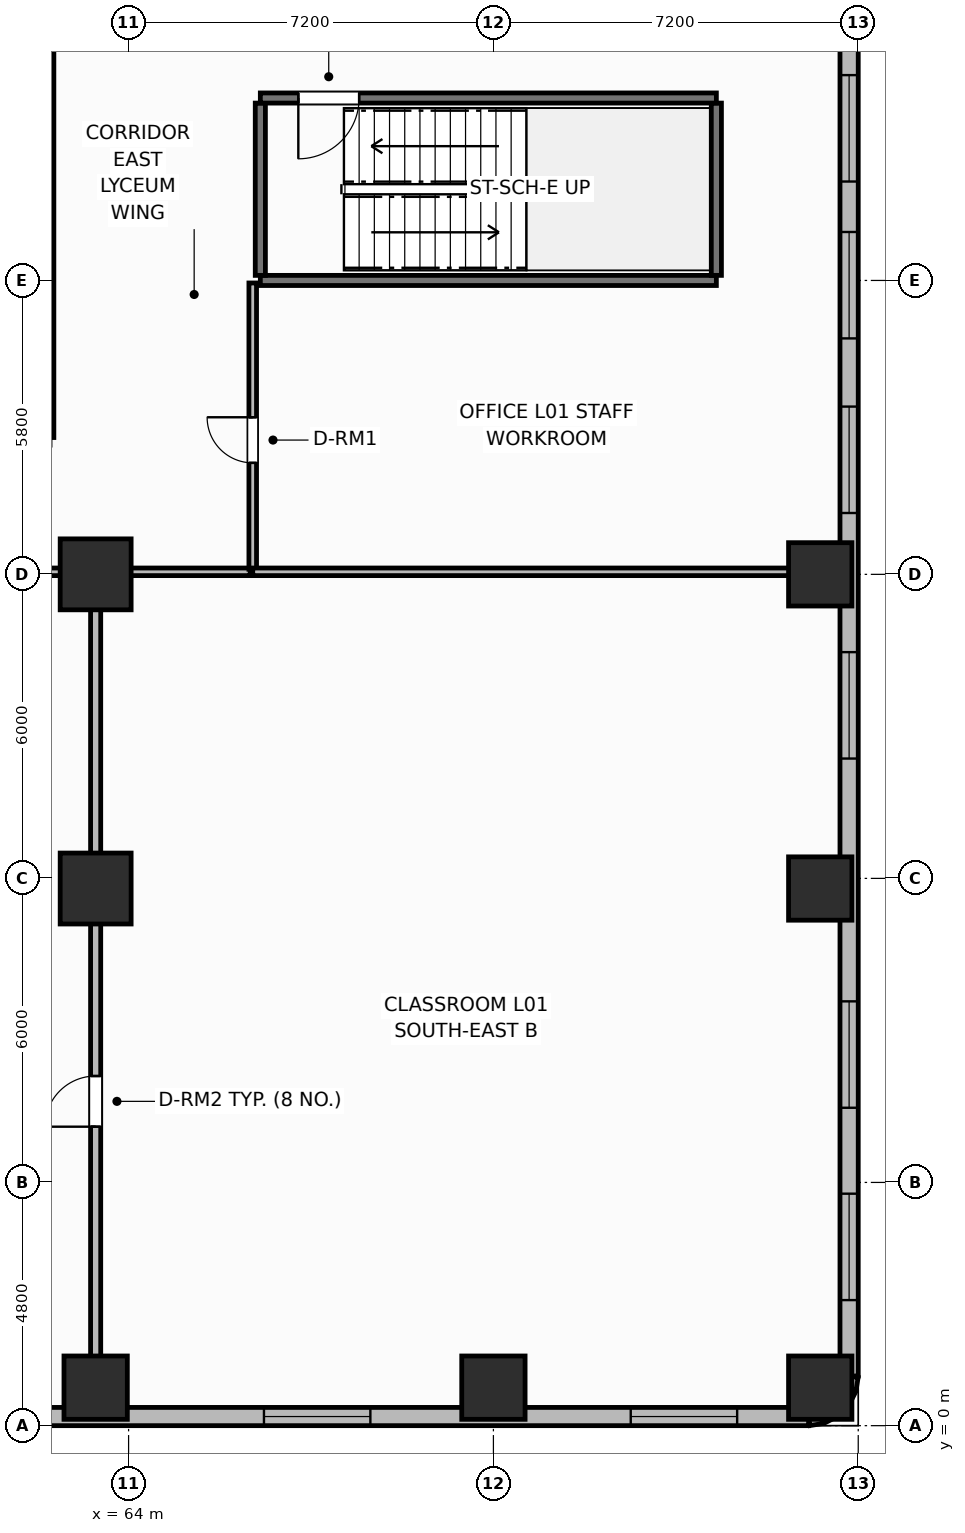
"""IFC4 building model, lengths in metres.
Left out: names, types, materials, properties, quantities, classifications, styles, units other than length and angle.
Written with IfcOpenShell. Run it as: python <this file> out.ifc"""

import sys

from ifc_helpers import new_model, si_unit, direction, frame, frame_2d, origin, origin_2d, place, context, subcontext, project, spatial, rectangle, extrude, element, fill, save


model = new_model("IFC4")
c1 = context("Model", 3, precision=1e-05, world=origin(), true_north=direction((0.0, 1.0)))
c2 = subcontext(c1, "Body", "Model", "MODEL_VIEW")
j1 = project(units=[si_unit("LENGTHUNIT", "METRE"), si_unit("PLANEANGLEUNIT", "RADIAN")], contexts=[c1])
p1 = place(None, origin())
s1 = spatial("IfcSite", under=j1, at=p1, CompositionType="ELEMENT")
p2 = place(p1, origin())
s2 = spatial("IfcBuilding", under=s1, at=p2, CompositionType="ELEMENT")
p3 = place(p2, frame((0.0, 0.0, 6.6)))
s3 = spatial("IfcBuildingStorey", under=s2, at=p3, CompositionType="ELEMENT", Elevation=6.6)
for number, where, z_axis, x_axis in (
    (1, (63.35, 0.75, 0.0), (0.0, 0.0, 1.0), (1.0, 0.0, 0.0)),
    (2, (71.2, 0.75, 0.0), (0.0, 0.0, 1.0), (1.0, 0.0, 0.0)),
    (3, (77.65, 0.75, 0.0), (0.0, 0.0, 1.0), (1.0, 0.0, 0.0)),
    (4, (77.65, 10.6, 0.0), (0.0, 0.0, 1.0), (1.0, 0.0, 0.0)),
    (5, (77.65, 16.8, 0.0), (0.0, 0.0, 1.0), (1.0, 0.0, 0.0)),
):
    element("IfcColumn", number, at=place(p3, frame(where, z_axis=z_axis, x_axis=x_axis)), inside=s3, PredefinedType="COLUMN", context=c2, shape_type="SweptSolid", body=[
        extrude(rectangle(XDim=1.25, YDim=1.25, at=origin_2d()), origin(), (0.0, 0.0, 1.0), 4.5),
    ])
for number, where, z_axis, x_axis in (
    (6, (63.35, 10.6, 0.0), (0.0, 0.0, 1.0), (1.0, 0.0, 0.0)),
    (7, (63.35, 16.8, 0.0), (0.0, 0.0, 1.0), (1.0, 0.0, 0.0)),
):
    element("IfcColumn", number, at=place(p3, frame(where, z_axis=z_axis, x_axis=x_axis)), inside=s3, PredefinedType="COLUMN", context=c2, shape_type="SweptSolid", body=[
        extrude(rectangle(XDim=1.4, YDim=1.4, at=origin_2d()), origin(), (0.0, 0.0, 1.0), 4.5),
    ])
p4 = place(p3, frame((21.83, 0.18, 0.0), z_axis=(0.0, 0.0, 1.0), x_axis=(1.0, 0.0, 0.0)))
e8 = element("IfcWall", 8, at=p4, inside=s3, PredefinedType="SOLIDWALL", context=c2, shape_type="SweptSolid", body=[
    extrude(rectangle(XDim=55.59, YDim=0.36, at=frame_2d((27.795, 0.0))), origin(), (0.0, 0.0, 1.0), 3.48),
])
p5 = place(p4, frame((5.029, 0.0, 0.85)))
e9 = element("IfcOpeningElement", 9, at=p5, cuts=e8, PredefinedType="OPENING", context=c2, shape_type="SweptSolid", body=[
    extrude(rectangle(XDim=2.1, YDim=2.2, at=frame_2d((1.05, 1.1))), frame((0.0, 0.19, 0.0), z_axis=(0.0, -1.0, 0.0), x_axis=(1.0, 0.0, 0.0)), (0.0, 0.0, 1.0), 0.38),
])
p6 = place(p4, frame((8.648, 0.0, 0.85)))
e10 = element("IfcOpeningElement", 10, at=p6, cuts=e8, PredefinedType="OPENING", context=c2, shape_type="SweptSolid", body=[
    extrude(rectangle(XDim=2.1, YDim=2.2, at=frame_2d((1.05, 1.1))), frame((0.0, 0.19, 0.0), z_axis=(0.0, -1.0, 0.0), x_axis=(1.0, 0.0, 0.0)), (0.0, 0.0, 1.0), 0.38),
])
p7 = place(p4, frame((12.268, 0.0, 0.85)))
e11 = element("IfcOpeningElement", 11, at=p7, cuts=e8, PredefinedType="OPENING", context=c2, shape_type="SweptSolid", body=[
    extrude(rectangle(XDim=2.1, YDim=2.2, at=frame_2d((1.05, 1.1))), frame((0.0, 0.19, 0.0), z_axis=(0.0, -1.0, 0.0), x_axis=(1.0, 0.0, 0.0)), (0.0, 0.0, 1.0), 0.38),
])
p8 = place(p4, frame((19.506, 0.0, 0.85)))
e12 = element("IfcOpeningElement", 12, at=p8, cuts=e8, PredefinedType="OPENING", context=c2, shape_type="SweptSolid", body=[
    extrude(rectangle(XDim=2.1, YDim=2.2, at=frame_2d((1.05, 1.1))), frame((0.0, 0.19, 0.0), z_axis=(0.0, -1.0, 0.0), x_axis=(1.0, 0.0, 0.0)), (0.0, 0.0, 1.0), 0.38),
])
p9 = place(p4, frame((23.126, 0.0, 0.85)))
e13 = element("IfcOpeningElement", 13, at=p9, cuts=e8, PredefinedType="OPENING", context=c2, shape_type="SweptSolid", body=[
    extrude(rectangle(XDim=2.1, YDim=2.2, at=frame_2d((1.05, 1.1))), frame((0.0, 0.19, 0.0), z_axis=(0.0, -1.0, 0.0), x_axis=(1.0, 0.0, 0.0)), (0.0, 0.0, 1.0), 0.38),
])
p10 = place(p4, frame((26.745, 0.0, 0.85)))
e14 = element("IfcOpeningElement", 14, at=p10, cuts=e8, PredefinedType="OPENING", context=c2, shape_type="SweptSolid", body=[
    extrude(rectangle(XDim=2.1, YDim=2.2, at=frame_2d((1.05, 1.1))), frame((0.0, 0.19, 0.0), z_axis=(0.0, -1.0, 0.0), x_axis=(1.0, 0.0, 0.0)), (0.0, 0.0, 1.0), 0.38),
])
p11 = place(p4, frame((33.984, 0.0, 0.85)))
e15 = element("IfcOpeningElement", 15, at=p11, cuts=e8, PredefinedType="OPENING", context=c2, shape_type="SweptSolid", body=[
    extrude(rectangle(XDim=2.1, YDim=2.2, at=frame_2d((1.05, 1.1))), frame((0.0, 0.19, 0.0), z_axis=(0.0, -1.0, 0.0), x_axis=(1.0, 0.0, 0.0)), (0.0, 0.0, 1.0), 0.38),
])
p12 = place(p4, frame((37.603, 0.0, 0.85)))
e16 = element("IfcOpeningElement", 16, at=p12, cuts=e8, PredefinedType="OPENING", context=c2, shape_type="SweptSolid", body=[
    extrude(rectangle(XDim=2.1, YDim=2.2, at=frame_2d((1.05, 1.1))), frame((0.0, 0.19, 0.0), z_axis=(0.0, -1.0, 0.0), x_axis=(1.0, 0.0, 0.0)), (0.0, 0.0, 1.0), 0.38),
])
p13 = place(p4, frame((44.842, 0.0, 0.85)))
e17 = element("IfcOpeningElement", 17, at=p13, cuts=e8, PredefinedType="OPENING", context=c2, shape_type="SweptSolid", body=[
    extrude(rectangle(XDim=2.1, YDim=2.2, at=frame_2d((1.05, 1.1))), frame((0.0, 0.19, 0.0), z_axis=(0.0, -1.0, 0.0), x_axis=(1.0, 0.0, 0.0)), (0.0, 0.0, 1.0), 0.38),
])
p14 = place(p4, frame((52.08, 0.0, 0.85)))
e18 = element("IfcOpeningElement", 18, at=p14, cuts=e8, PredefinedType="OPENING", context=c2, shape_type="SweptSolid", body=[
    extrude(rectangle(XDim=2.1, YDim=2.2, at=frame_2d((1.05, 1.1))), frame((0.0, 0.19, 0.0), z_axis=(0.0, -1.0, 0.0), x_axis=(1.0, 0.0, 0.0)), (0.0, 0.0, 1.0), 0.38),
])
p15 = place(p3, frame((77.42, 0.18, 0.0), z_axis=(0.0, 0.0, 1.0), x_axis=(0.987604361038, 0.156963773077, 0.0)))
e19 = element("IfcWall", 19, at=p15, inside=s3, PredefinedType="SOLIDWALL", context=c2, shape_type="SweptSolid", body=[
    extrude(rectangle(XDim=0.25, YDim=0.36, at=frame_2d((0.125, 0.0))), origin(), (0.0, 0.0, 1.0), 3.48),
])
for number, where, z_axis, x_axis in (
    (20, (77.667, 0.219, 0.0), (0.0, 0.0, 1.0), (0.891, 0.454, 0.0)),
    (21, (77.89, 0.333, 0.0), (0.0, 0.0, 1.0), (0.707, 0.707, 0.0)),
):
    element("IfcWall", number, at=place(p3, frame(where, z_axis=z_axis, x_axis=x_axis)), inside=s3, PredefinedType="SOLIDWALL", context=c2, shape_type="SweptSolid", body=[
        extrude(rectangle(XDim=0.25, YDim=0.36, at=frame_2d((0.125, 0.0))), origin(), (0.0, 0.0, 1.0), 3.48),
    ])
p16 = place(p3, frame((78.067, 0.51, 0.0), z_axis=(0.0, 0.0, 1.0), x_axis=(0.454217786225, 0.89089067942, 0.0)))
e22 = element("IfcWall", 22, at=p16, inside=s3, PredefinedType="SOLIDWALL", context=c2, shape_type="SweptSolid", body=[
    extrude(rectangle(XDim=0.25, YDim=0.36, at=frame_2d((0.125, 0.0))), origin(), (0.0, 0.0, 1.0), 3.48),
])
p17 = place(p3, frame((78.181, 0.733, 0.0), z_axis=(0.0, 0.0, 1.0), x_axis=(0.156163049852, 0.987731290312, 0.0)))
e23 = element("IfcWall", 23, at=p17, inside=s3, PredefinedType="SOLIDWALL", context=c2, shape_type="SweptSolid", body=[
    extrude(rectangle(XDim=0.25, YDim=0.36, at=frame_2d((0.125, 0.0))), origin(), (0.0, 0.0, 1.0), 3.48),
])
p18 = place(p3, frame((78.22, 0.98, 0.0), z_axis=(0.0, 0.0, 1.0), x_axis=(0.0, 1.0, 0.0)))
e24 = element("IfcWall", 24, at=p18, inside=s3, PredefinedType="SOLIDWALL", context=c2, shape_type="SweptSolid", body=[
    extrude(rectangle(XDim=54.44, YDim=0.36, at=frame_2d((27.22, 0.0))), origin(), (0.0, 0.0, 1.0), 3.48),
])
p19 = place(p18, frame((1.498, 0.0, 0.85)))
e25 = element("IfcOpeningElement", 25, at=p19, cuts=e24, PredefinedType="OPENING", context=c2, shape_type="SweptSolid", body=[
    extrude(rectangle(XDim=2.1, YDim=2.2, at=frame_2d((1.05, 1.1))), frame((0.0, 0.19, 0.0), z_axis=(0.0, -1.0, 0.0), x_axis=(1.0, 0.0, 0.0)), (0.0, 0.0, 1.0), 0.38),
])
p20 = place(p18, frame((5.294, 0.0, 0.85)))
e26 = element("IfcOpeningElement", 26, at=p20, cuts=e24, PredefinedType="OPENING", context=c2, shape_type="SweptSolid", body=[
    extrude(rectangle(XDim=2.1, YDim=2.2, at=frame_2d((1.05, 1.1))), frame((0.0, 0.19, 0.0), z_axis=(0.0, -1.0, 0.0), x_axis=(1.0, 0.0, 0.0)), (0.0, 0.0, 1.0), 0.38),
])
p21 = place(p18, frame((12.185, 0.0, 0.85)))
e27 = element("IfcOpeningElement", 27, at=p21, cuts=e24, PredefinedType="OPENING", context=c2, shape_type="SweptSolid", body=[
    extrude(rectangle(XDim=2.1, YDim=2.2, at=frame_2d((1.05, 1.1))), frame((0.0, 0.19, 0.0), z_axis=(0.0, -1.0, 0.0), x_axis=(1.0, 0.0, 0.0)), (0.0, 0.0, 1.0), 0.38),
])
p22 = place(p18, frame((17.031, 0.0, 0.85)))
e28 = element("IfcOpeningElement", 28, at=p22, cuts=e24, PredefinedType="OPENING", context=c2, shape_type="SweptSolid", body=[
    extrude(rectangle(XDim=2.1, YDim=2.2, at=frame_2d((1.05, 1.1))), frame((0.0, 0.19, 0.0), z_axis=(0.0, -1.0, 0.0), x_axis=(1.0, 0.0, 0.0)), (0.0, 0.0, 1.0), 0.38),
])
p23 = place(p18, frame((20.476, 0.0, 0.85)))
e29 = element("IfcOpeningElement", 29, at=p23, cuts=e24, PredefinedType="OPENING", context=c2, shape_type="SweptSolid", body=[
    extrude(rectangle(XDim=2.1, YDim=2.2, at=frame_2d((1.05, 1.1))), frame((0.0, 0.19, 0.0), z_axis=(0.0, -1.0, 0.0), x_axis=(1.0, 0.0, 0.0)), (0.0, 0.0, 1.0), 0.38),
])
p24 = place(p18, frame((23.572, 0.0, 0.85)))
e30 = element("IfcOpeningElement", 30, at=p24, cuts=e24, PredefinedType="OPENING", context=c2, shape_type="SweptSolid", body=[
    extrude(rectangle(XDim=2.1, YDim=2.2, at=frame_2d((1.05, 1.1))), frame((0.0, 0.19, 0.0), z_axis=(0.0, -1.0, 0.0), x_axis=(1.0, 0.0, 0.0)), (0.0, 0.0, 1.0), 0.38),
])
p25 = place(p18, frame((28.768, 0.0, 0.85)))
e31 = element("IfcOpeningElement", 31, at=p25, cuts=e24, PredefinedType="OPENING", context=c2, shape_type="SweptSolid", body=[
    extrude(rectangle(XDim=2.1, YDim=2.2, at=frame_2d((1.05, 1.1))), frame((0.0, 0.19, 0.0), z_axis=(0.0, -1.0, 0.0), x_axis=(1.0, 0.0, 0.0)), (0.0, 0.0, 1.0), 0.38),
])
p26 = place(p18, frame((31.864, 0.0, 0.85)))
e32 = element("IfcOpeningElement", 32, at=p26, cuts=e24, PredefinedType="OPENING", context=c2, shape_type="SweptSolid", body=[
    extrude(rectangle(XDim=2.1, YDim=2.2, at=frame_2d((1.05, 1.1))), frame((0.0, 0.19, 0.0), z_axis=(0.0, -1.0, 0.0), x_axis=(1.0, 0.0, 0.0)), (0.0, 0.0, 1.0), 0.38),
])
p27 = place(p18, frame((35.309, 0.0, 0.85)))
e33 = element("IfcOpeningElement", 33, at=p27, cuts=e24, PredefinedType="OPENING", context=c2, shape_type="SweptSolid", body=[
    extrude(rectangle(XDim=2.1, YDim=2.2, at=frame_2d((1.05, 1.1))), frame((0.0, 0.19, 0.0), z_axis=(0.0, -1.0, 0.0), x_axis=(1.0, 0.0, 0.0)), (0.0, 0.0, 1.0), 0.38),
])
p28 = place(p18, frame((40.155, 0.0, 0.85)))
e34 = element("IfcOpeningElement", 34, at=p28, cuts=e24, PredefinedType="OPENING", context=c2, shape_type="SweptSolid", body=[
    extrude(rectangle(XDim=2.1, YDim=2.2, at=frame_2d((1.05, 1.1))), frame((0.0, 0.19, 0.0), z_axis=(0.0, -1.0, 0.0), x_axis=(1.0, 0.0, 0.0)), (0.0, 0.0, 1.0), 0.38),
])
p29 = place(p18, frame((47.046, 0.0, 0.85)))
e35 = element("IfcOpeningElement", 35, at=p29, cuts=e24, PredefinedType="OPENING", context=c2, shape_type="SweptSolid", body=[
    extrude(rectangle(XDim=2.1, YDim=2.2, at=frame_2d((1.05, 1.1))), frame((0.0, 0.19, 0.0), z_axis=(0.0, -1.0, 0.0), x_axis=(1.0, 0.0, 0.0)), (0.0, 0.0, 1.0), 0.38),
])
p30 = place(p18, frame((50.842, 0.0, 0.85)))
e36 = element("IfcOpeningElement", 36, at=p30, cuts=e24, PredefinedType="OPENING", context=c2, shape_type="SweptSolid", body=[
    extrude(rectangle(XDim=2.1, YDim=2.2, at=frame_2d((1.05, 1.1))), frame((0.0, 0.19, 0.0), z_axis=(0.0, -1.0, 0.0), x_axis=(1.0, 0.0, 0.0)), (0.0, 0.0, 1.0), 0.38),
])
p31 = place(p3, frame((66.6, 22.6, 0.0), z_axis=(0.0, 0.0, 1.0), x_axis=(1.0, 0.0, 0.0)))
e37 = element("IfcWall", 37, at=p31, inside=s3, PredefinedType="SHEAR", context=c2, shape_type="SweptSolid", body=[
    extrude(rectangle(XDim=9.0, YDim=0.2, at=frame_2d((4.5, 0.0))), origin(), (0.0, 0.0, 1.0), 4.5),
])
for number, where, z_axis, x_axis in (
    (38, (66.6, 22.7, 0.0), (0.0, 0.0, 1.0), (0.0, 1.0, 0.0)),
    (39, (75.6, 22.7, 0.0), (0.0, 0.0, 1.0), (0.0, 1.0, 0.0)),
):
    element("IfcWall", number, at=place(p3, frame(where, z_axis=z_axis, x_axis=x_axis)), inside=s3, PredefinedType="SHEAR", context=c2, shape_type="SweptSolid", body=[
        extrude(rectangle(XDim=3.4, YDim=0.2, at=frame_2d((1.7, 0.0))), origin(), (0.0, 0.0, 1.0), 4.5),
    ])
p32 = place(p3, frame((75.6, 26.2, 0.0), z_axis=(0.0, 0.0, 1.0), x_axis=(-1.0, 0.0, 0.0)))
e40 = element("IfcWall", 40, at=p32, inside=s3, PredefinedType="SHEAR", context=c2, shape_type="SweptSolid", body=[
    extrude(rectangle(XDim=9.0, YDim=0.2, at=frame_2d((4.5, 0.0))), origin(), (0.0, 0.0, 1.0), 4.5),
])
p33 = place(p32, frame((7.05, 0.0, 0.0)))
e41 = element("IfcOpeningElement", 41, at=p33, cuts=e40, PredefinedType="OPENING", context=c2, shape_type="SweptSolid", body=[
    extrude(rectangle(XDim=1.2, YDim=2.15, at=frame_2d((0.6, 1.075))), frame((0.0, 0.11, 0.0), z_axis=(0.0, -1.0, 0.0), x_axis=(1.0, 0.0, 0.0)), (0.0, 0.0, 1.0), 0.22),
])
p34 = place(p3, frame((62.45, 19.5, 0.0), z_axis=(0.0, 0.0, 1.0), x_axis=(0.0, 1.0, 0.0)))
e42 = element("IfcWall", 42, at=p34, inside=s3, PredefinedType="PARTITIONING", context=c2, shape_type="SweptSolid", body=[
    extrude(rectangle(XDim=17.4, YDim=0.15, at=frame_2d((8.7, 0.0))), origin(), (0.0, 0.0, 1.0), 3.42),
])
p35 = place(p3, frame((63.35, 0.4, 0.0), z_axis=(0.0, 0.0, 1.0), x_axis=(0.0, 1.0, 0.0)))
e43 = element("IfcWall", 43, at=p35, inside=s3, PredefinedType="PARTITIONING", context=c2, shape_type="SweptSolid", body=[
    extrude(rectangle(XDim=16.4, YDim=0.2, at=frame_2d((8.2, 0.0))), origin(), (0.0, 0.0, 1.0), 3.42),
])
p36 = place(p35, frame((5.5, 0.0, 0.0)))
e44 = element("IfcOpeningElement", 44, at=p36, cuts=e43, PredefinedType="OPENING", context=c2, shape_type="SweptSolid", body=[
    extrude(rectangle(XDim=1.0, YDim=2.15, at=frame_2d((0.5, 1.075))), frame((0.0, 0.11, 0.0), z_axis=(0.0, -1.0, 0.0), x_axis=(1.0, 0.0, 0.0)), (0.0, 0.0, 1.0), 0.22),
])
p37 = place(p3, frame((53.15, 16.85, 0.0), z_axis=(0.0, 0.0, 1.0), x_axis=(1.0, 0.0, 0.0)))
e45 = element("IfcWall", 45, at=p37, inside=s3, PredefinedType="PARTITIONING", context=c2, shape_type="SweptSolid", body=[
    extrude(rectangle(XDim=13.25, YDim=0.15, at=frame_2d((6.625, 0.0))), origin(), (0.0, 0.0, 1.0), 3.42),
])
p38 = place(p37, frame((4.2, 0.0, 0.0)))
e46 = element("IfcOpeningElement", 46, at=p38, cuts=e45, PredefinedType="OPENING", context=c2, shape_type="SweptSolid", body=[
    extrude(rectangle(XDim=1.0, YDim=2.15, at=frame_2d((0.5, 1.075))), frame((0.0, 0.085, 0.0), z_axis=(0.0, -1.0, 0.0), x_axis=(1.0, 0.0, 0.0)), (0.0, 0.0, 1.0), 0.17),
])
p39 = place(p3, frame((66.45, 16.9, 0.0), z_axis=(0.0, 0.0, 1.0), x_axis=(0.0, 1.0, 0.0)))
e47 = element("IfcWall", 47, at=p39, inside=s3, PredefinedType="PARTITIONING", context=c2, shape_type="SweptSolid", body=[
    extrude(rectangle(XDim=5.65, YDim=0.15, at=frame_2d((2.825, 0.0))), origin(), (0.0, 0.0, 1.0), 3.42),
])
p40 = place(p39, frame((2.1, 0.0, 0.0)))
e48 = element("IfcOpeningElement", 48, at=p40, cuts=e47, PredefinedType="OPENING", context=c2, shape_type="SweptSolid", body=[
    extrude(rectangle(XDim=0.9, YDim=2.1, at=frame_2d((0.45, 1.05))), frame((0.0, 0.085, 0.0), z_axis=(0.0, -1.0, 0.0), x_axis=(1.0, 0.0, 0.0)), (0.0, 0.0, 1.0), 0.17),
])
p41 = place(p3, frame((66.45, 16.85, 0.0), z_axis=(0.0, 0.0, 1.0), x_axis=(1.0, 0.0, 0.0)))
e49 = element("IfcWall", 49, at=p41, inside=s3, PredefinedType="PARTITIONING", context=c2, shape_type="SweptSolid", body=[
    extrude(rectangle(XDim=11.55, YDim=0.15, at=frame_2d((5.775, 0.0))), origin(), (0.0, 0.0, 1.0), 3.42),
])
p42 = place(p13, origin())
e50 = element("IfcWindow", 50, at=p42, inside=s3, PartitioningType="SINGLE_PANEL", PredefinedType="WINDOW", context=c2, shape_type="SweptSolid", body=[
    extrude(rectangle(XDim=2.1, YDim=2.2, at=frame_2d((1.05, 1.1))), frame((0.0, 0.03, 0.0), z_axis=(0.0, -1.0, 0.0), x_axis=(1.0, 0.0, 0.0)), (0.0, 0.0, 1.0), 0.06),
])
fill(e17, e50)
p43 = place(p14, origin())
e51 = element("IfcWindow", 51, at=p43, inside=s3, PartitioningType="SINGLE_PANEL", PredefinedType="WINDOW", context=c2, shape_type="SweptSolid", body=[
    extrude(rectangle(XDim=2.1, YDim=2.2, at=frame_2d((1.05, 1.1))), frame((0.0, 0.03, 0.0), z_axis=(0.0, -1.0, 0.0), x_axis=(1.0, 0.0, 0.0)), (0.0, 0.0, 1.0), 0.06),
])
fill(e18, e51)
p44 = place(p19, origin())
e52 = element("IfcWindow", 52, at=p44, inside=s3, PartitioningType="SINGLE_PANEL", PredefinedType="WINDOW", context=c2, shape_type="SweptSolid", body=[
    extrude(rectangle(XDim=2.1, YDim=2.2, at=frame_2d((1.05, 1.1))), frame((0.0, 0.03, 0.0), z_axis=(0.0, -1.0, 0.0), x_axis=(1.0, 0.0, 0.0)), (0.0, 0.0, 1.0), 0.06),
])
fill(e25, e52)
p45 = place(p20, origin())
e53 = element("IfcWindow", 53, at=p45, inside=s3, PartitioningType="SINGLE_PANEL", PredefinedType="WINDOW", context=c2, shape_type="SweptSolid", body=[
    extrude(rectangle(XDim=2.1, YDim=2.2, at=frame_2d((1.05, 1.1))), frame((0.0, 0.03, 0.0), z_axis=(0.0, -1.0, 0.0), x_axis=(1.0, 0.0, 0.0)), (0.0, 0.0, 1.0), 0.06),
])
fill(e26, e53)
p46 = place(p21, origin())
e54 = element("IfcWindow", 54, at=p46, inside=s3, PartitioningType="SINGLE_PANEL", PredefinedType="WINDOW", context=c2, shape_type="SweptSolid", body=[
    extrude(rectangle(XDim=2.1, YDim=2.2, at=frame_2d((1.05, 1.1))), frame((0.0, 0.03, 0.0), z_axis=(0.0, -1.0, 0.0), x_axis=(1.0, 0.0, 0.0)), (0.0, 0.0, 1.0), 0.06),
])
fill(e27, e54)
p47 = place(p22, origin())
e55 = element("IfcWindow", 55, at=p47, inside=s3, PartitioningType="SINGLE_PANEL", PredefinedType="WINDOW", context=c2, shape_type="SweptSolid", body=[
    extrude(rectangle(XDim=2.1, YDim=2.2, at=frame_2d((1.05, 1.1))), frame((0.0, 0.03, 0.0), z_axis=(0.0, -1.0, 0.0), x_axis=(1.0, 0.0, 0.0)), (0.0, 0.0, 1.0), 0.06),
])
fill(e28, e55)
p48 = place(p23, origin())
e56 = element("IfcWindow", 56, at=p48, inside=s3, PartitioningType="SINGLE_PANEL", PredefinedType="WINDOW", context=c2, shape_type="SweptSolid", body=[
    extrude(rectangle(XDim=2.1, YDim=2.2, at=frame_2d((1.05, 1.1))), frame((0.0, 0.03, 0.0), z_axis=(0.0, -1.0, 0.0), x_axis=(1.0, 0.0, 0.0)), (0.0, 0.0, 1.0), 0.06),
])
fill(e29, e56)
p49 = place(p24, origin())
e57 = element("IfcWindow", 57, at=p49, inside=s3, PartitioningType="SINGLE_PANEL", PredefinedType="WINDOW", context=c2, shape_type="SweptSolid", body=[
    extrude(rectangle(XDim=2.1, YDim=2.2, at=frame_2d((1.05, 1.1))), frame((0.0, 0.03, 0.0), z_axis=(0.0, -1.0, 0.0), x_axis=(1.0, 0.0, 0.0)), (0.0, 0.0, 1.0), 0.06),
])
fill(e30, e57)
p50 = place(p33, origin())
e58 = element("IfcDoor", 58, at=p50, inside=s3, OperationType="SINGLE_SWING_RIGHT", PredefinedType="DOOR", context=c2, shape_type="SweptSolid", body=[
    extrude(rectangle(XDim=1.2, YDim=2.15, at=frame_2d((0.6, 1.075))), frame((0.0, 0.025, 0.0), z_axis=(0.0, -1.0, 0.0), x_axis=(1.0, 0.0, 0.0)), (0.0, 0.0, 1.0), 0.05),
])
fill(e41, e58)
p51 = place(p36, origin())
e59 = element("IfcDoor", 59, at=p51, inside=s3, OperationType="SINGLE_SWING_LEFT", PredefinedType="DOOR", context=c2, shape_type="SweptSolid", body=[
    extrude(rectangle(XDim=1.0, YDim=2.15, at=frame_2d((0.5, 1.075))), frame((0.0, 0.025, 0.0), z_axis=(0.0, -1.0, 0.0), x_axis=(1.0, 0.0, 0.0)), (0.0, 0.0, 1.0), 0.05),
])
fill(e44, e59)
p52 = place(p40, origin())
e60 = element("IfcDoor", 60, at=p52, inside=s3, OperationType="SINGLE_SWING_RIGHT", PredefinedType="DOOR", context=c2, shape_type="SweptSolid", body=[
    extrude(rectangle(XDim=0.9, YDim=2.1, at=frame_2d((0.45, 1.05))), frame((0.0, 0.025, 0.0), z_axis=(0.0, -1.0, 0.0), x_axis=(1.0, 0.0, 0.0)), (0.0, 0.0, 1.0), 0.05),
])
fill(e48, e60)
save(model, sys.argv[1])
